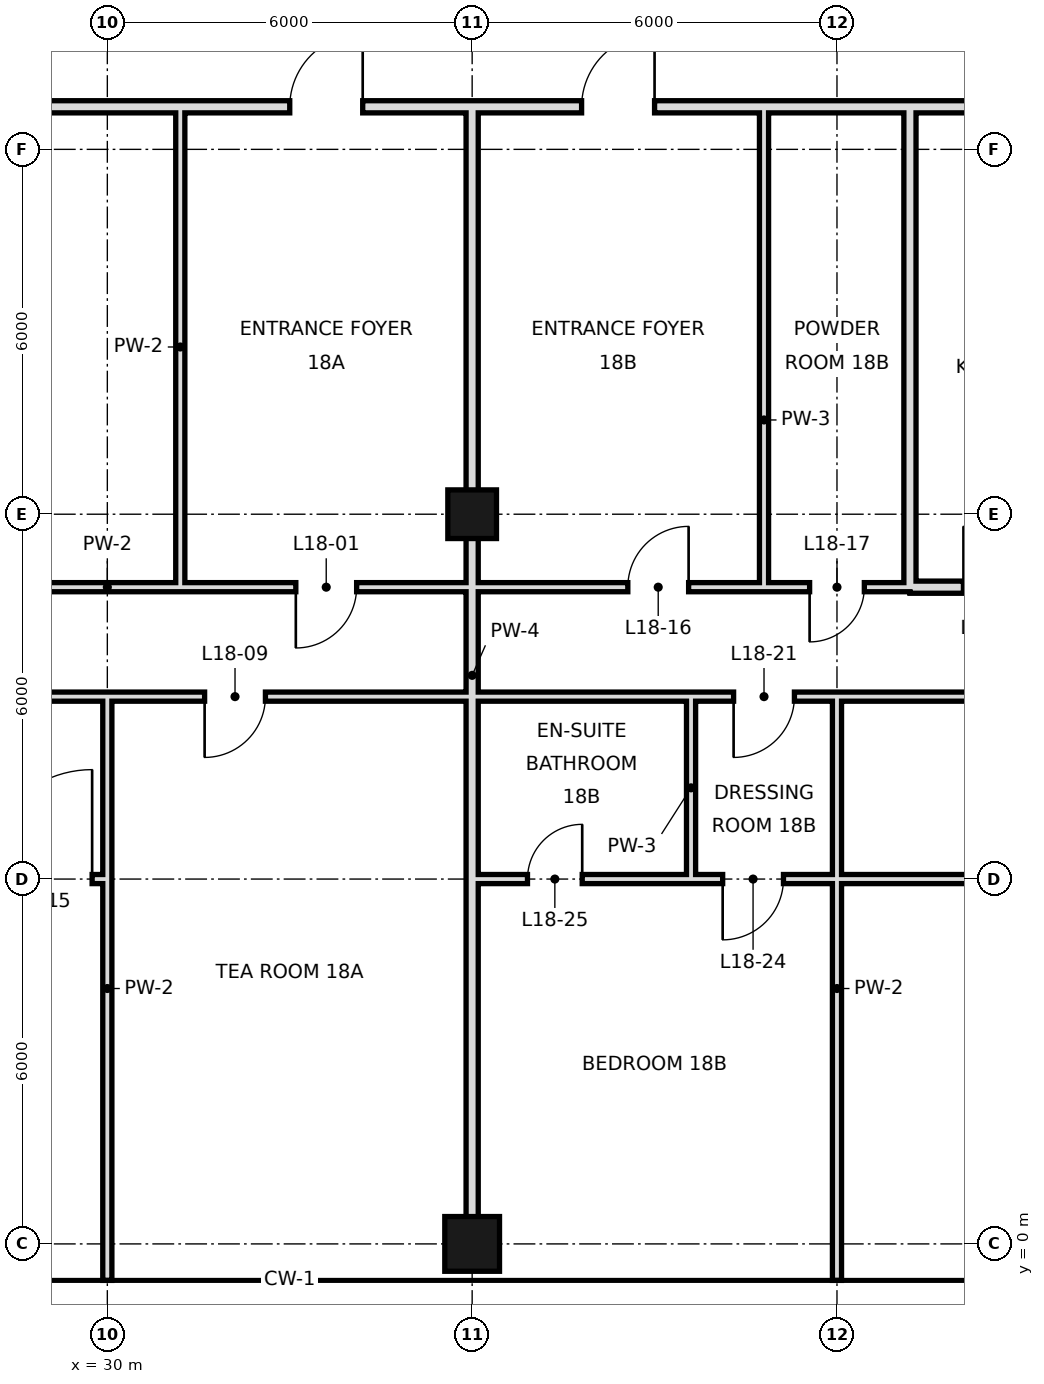
"""IFC4 building model, lengths in metres.
Left out: names, types, materials, properties, quantities, classifications, styles, units other than length and angle.
Written with IfcOpenShell. Run it as: python <this file> out.ifc"""

import sys

from ifc_helpers import new_model, si_unit, direction, frame, frame_2d, origin, origin_2d, place, context, subcontext, project, spatial, rectangle, hollow_rectangle, extrude, element, fill, save


model = new_model("IFC4")
c1 = context("Model", 3, precision=1e-05, world=origin(), true_north=direction((0.0, 1.0)))
c2 = subcontext(c1, "Body", "Model", "MODEL_VIEW")
j1 = project(units=[si_unit("LENGTHUNIT", "METRE"), si_unit("PLANEANGLEUNIT", "RADIAN")], contexts=[c1])
p1 = place(None, origin())
s1 = spatial("IfcSite", under=j1, at=p1, CompositionType="ELEMENT")
p2 = place(p1, origin())
s2 = spatial("IfcBuilding", under=s1, at=p2, CompositionType="ELEMENT")
p3 = place(p2, frame((0.0, 0.0, 85.8)))
s3 = spatial("IfcBuildingStorey", under=s2, at=p3, CompositionType="ELEMENT", Elevation=85.8)
p4 = place(p3, frame((36.0, 0.0, 0.0), z_axis=(0.0, 0.0, 1.0), x_axis=(1.0, 0.0, 0.0)))
e1 = element("IfcColumn", 1, at=p4, inside=s3, PredefinedType="COLUMN", context=c2, shape_type="SweptSolid", body=[
    extrude(hollow_rectangle(XDim=0.9, YDim=0.9, WallThickness=0.045, at=origin_2d()), origin(), (0.0, 0.0, 1.0), 4.4),
])
p5 = place(p3, frame((36.0, 12.0, 0.0), z_axis=(0.0, 0.0, 1.0), x_axis=(1.0, 0.0, 0.0)))
e2 = element("IfcColumn", 2, at=p5, inside=s3, PredefinedType="COLUMN", context=c2, shape_type="SweptSolid", body=[
    extrude(hollow_rectangle(XDim=0.8, YDim=0.8, WallThickness=0.04, at=origin_2d()), origin(), (0.0, 0.0, 1.0), 4.4),
])
p6 = place(p3, frame((30.0, -0.6, 0.0), z_axis=(0.0, 0.0, 1.0), x_axis=(0.0, 1.0, 0.0)))
e3 = element("IfcWall", 3, at=p6, inside=s3, PredefinedType="PARTITIONING", context=c2, shape_type="SweptSolid", body=[
    extrude(rectangle(XDim=9.6, YDim=0.15, at=frame_2d((4.8, 0.0))), origin(), (0.0, 0.0, 1.0), 3.4),
])
p7 = place(p3, frame((31.2, 10.8, 0.0), z_axis=(0.0, 0.0, 1.0), x_axis=(0.0, 1.0, 0.0)))
e4 = element("IfcWall", 4, at=p7, inside=s3, PredefinedType="PARTITIONING", context=c2, shape_type="SweptSolid", body=[
    extrude(rectangle(XDim=7.9, YDim=0.15, at=frame_2d((3.95, 0.0))), origin(), (0.0, 0.0, 1.0), 4.1),
])
p8 = place(p3, frame((36.0, 0.0, 0.0), z_axis=(0.0, 0.0, 1.0), x_axis=(0.0, 1.0, 0.0)))
e5 = element("IfcWall", 5, at=p8, inside=s3, PredefinedType="SOLIDWALL", context=c2, shape_type="SweptSolid", body=[
    extrude(rectangle(XDim=18.7, YDim=0.2, at=frame_2d((9.35, 0.0))), origin(), (0.0, 0.0, 1.0), 3.4),
])
p9 = place(p3, frame((39.6, 6.0, 0.0), z_axis=(0.0, 0.0, 1.0), x_axis=(0.0, 1.0, 0.0)))
e6 = element("IfcWall", 6, at=p9, inside=s3, PredefinedType="PARTITIONING", context=c2, shape_type="SweptSolid", body=[
    extrude(rectangle(XDim=3.0, YDim=0.15, at=frame_2d((1.5, 0.0))), origin(), (0.0, 0.0, 1.0), 4.1),
])
p10 = place(p3, frame((40.8, 10.8, 0.0), z_axis=(0.0, 0.0, 1.0), x_axis=(0.0, 1.0, 0.0)))
e7 = element("IfcWall", 7, at=p10, inside=s3, PredefinedType="PARTITIONING", context=c2, shape_type="SweptSolid", body=[
    extrude(rectangle(XDim=7.9, YDim=0.15, at=frame_2d((3.95, 0.0))), origin(), (0.0, 0.0, 1.0), 4.1),
])
p11 = place(p3, frame((42.0, -0.6, 0.0), z_axis=(0.0, 0.0, 1.0), x_axis=(0.0, 1.0, 0.0)))
e8 = element("IfcWall", 8, at=p11, inside=s3, PredefinedType="PARTITIONING", context=c2, shape_type="SweptSolid", body=[
    extrude(rectangle(XDim=9.6, YDim=0.15, at=frame_2d((4.8, 0.0))), origin(), (0.0, 0.0, 1.0), 3.4),
])
p12 = place(p3, frame((43.2, 10.8, 0.0), z_axis=(0.0, 0.0, 1.0), x_axis=(0.0, 1.0, 0.0)))
e9 = element("IfcWall", 9, at=p12, inside=s3, PredefinedType="SOLIDWALL", context=c2, shape_type="SweptSolid", body=[
    extrude(rectangle(XDim=7.9, YDim=0.2, at=frame_2d((3.95, 0.0))), origin(), (0.0, 0.0, 1.0), 3.4),
])
p13 = place(p3, frame((43.2, 10.8, 0.0), z_axis=(0.0, 0.0, 1.0), x_axis=(1.0, 0.0, 0.0)))
e10 = element("IfcWall", 10, at=p13, inside=s3, PredefinedType="SOLIDWALL", context=c2, shape_type="SweptSolid", body=[
    extrude(rectangle(XDim=3.6, YDim=0.2, at=frame_2d((1.8, 0.0))), origin(), (0.0, 0.0, 1.0), 4.1),
])
p14 = place(p13, frame((0.88, 0.0, 0.0)))
e11 = element("IfcOpeningElement", 11, at=p14, cuts=e10, PredefinedType="OPENING", context=c2, shape_type="SweptSolid", body=[
    extrude(rectangle(XDim=1.0, YDim=2.4, at=frame_2d((0.5, 1.2))), frame((0.0, 0.11, 0.0), z_axis=(0.0, -1.0, 0.0), x_axis=(1.0, 0.0, 0.0)), (0.0, 0.0, 1.0), 0.22),
])
p15 = place(p3, frame((19.2, 10.8, 0.0), z_axis=(0.0, 0.0, 1.0), x_axis=(1.0, 0.0, 0.0)))
e12 = element("IfcWall", 12, at=p15, inside=s3, PredefinedType="PARTITIONING", context=c2, shape_type="SweptSolid", body=[
    extrude(rectangle(XDim=21.6, YDim=0.15, at=frame_2d((10.8, 0.0))), origin(), (0.0, 0.0, 1.0), 4.1),
])
p16 = place(p15, frame((13.9, 0.0, 0.0)))
e13 = element("IfcOpeningElement", 13, at=p16, cuts=e12, PredefinedType="OPENING", context=c2, shape_type="SweptSolid", body=[
    extrude(rectangle(XDim=1.0, YDim=2.4, at=frame_2d((0.5, 1.2))), frame((0.0, 0.085, 0.0), z_axis=(0.0, -1.0, 0.0), x_axis=(1.0, 0.0, 0.0)), (0.0, 0.0, 1.0), 0.17),
])
p17 = place(p15, frame((5.5, 0.0, 0.0)))
e14 = element("IfcOpeningElement", 14, at=p17, cuts=e12, PredefinedType="OPENING", context=c2, shape_type="SweptSolid", body=[
    extrude(rectangle(XDim=1.0, YDim=2.4, at=frame_2d((0.5, 1.2))), frame((0.0, 0.085, 0.0), z_axis=(0.0, -1.0, 0.0), x_axis=(1.0, 0.0, 0.0)), (0.0, 0.0, 1.0), 0.17),
])
p18 = place(p15, frame((19.36, 0.0, 0.0)))
e15 = element("IfcOpeningElement", 15, at=p18, cuts=e12, PredefinedType="OPENING", context=c2, shape_type="SweptSolid", body=[
    extrude(rectangle(XDim=1.0, YDim=2.4, at=frame_2d((0.5, 1.2))), frame((0.0, 0.085, 0.0), z_axis=(0.0, -1.0, 0.0), x_axis=(1.0, 0.0, 0.0)), (0.0, 0.0, 1.0), 0.17),
])
p19 = place(p3, frame((40.8, 10.8, 0.0), z_axis=(0.0, 0.0, 1.0), x_axis=(1.0, 0.0, 0.0)))
e16 = element("IfcWall", 16, at=p19, inside=s3, PredefinedType="PARTITIONING", context=c2, shape_type="SweptSolid", body=[
    extrude(rectangle(XDim=2.4, YDim=0.15, at=frame_2d((1.2, 0.0))), origin(), (0.0, 0.0, 1.0), 4.1),
])
p20 = place(p19, frame((0.75, 0.0, 0.0)))
e17 = element("IfcOpeningElement", 17, at=p20, cuts=e16, PredefinedType="OPENING", context=c2, shape_type="SweptSolid", body=[
    extrude(rectangle(XDim=0.9, YDim=2.4, at=frame_2d((0.45, 1.2))), frame((0.0, 0.085, 0.0), z_axis=(0.0, -1.0, 0.0), x_axis=(1.0, 0.0, 0.0)), (0.0, 0.0, 1.0), 0.17),
])
p21 = place(p3, frame((5.4, 18.7, 0.0), z_axis=(0.0, 0.0, 1.0), x_axis=(1.0, 0.0, 0.0)))
e18 = element("IfcWall", 18, at=p21, inside=s3, PredefinedType="SOLIDWALL", context=c2, shape_type="SweptSolid", body=[
    extrude(rectangle(XDim=37.8, YDim=0.2, at=frame_2d((18.9, 0.0))), origin(), (0.0, 0.0, 1.0), 3.4),
])
p22 = place(p21, frame((27.6, 0.0, 0.0)))
e19 = element("IfcOpeningElement", 19, at=p22, cuts=e18, PredefinedType="OPENING", context=c2, shape_type="SweptSolid", body=[
    extrude(rectangle(XDim=1.2, YDim=2.4, at=frame_2d((0.6, 1.2))), frame((0.0, 0.11, 0.0), z_axis=(0.0, -1.0, 0.0), x_axis=(1.0, 0.0, 0.0)), (0.0, 0.0, 1.0), 0.22),
])
p23 = place(p21, frame((32.4, 0.0, 0.0)))
e20 = element("IfcOpeningElement", 20, at=p23, cuts=e18, PredefinedType="OPENING", context=c2, shape_type="SweptSolid", body=[
    extrude(rectangle(XDim=1.2, YDim=2.4, at=frame_2d((0.6, 1.2))), frame((0.0, 0.11, 0.0), z_axis=(0.0, -1.0, 0.0), x_axis=(1.0, 0.0, 0.0)), (0.0, 0.0, 1.0), 0.22),
])
p24 = place(p3, frame((43.2, 18.7, 0.0), z_axis=(0.0, 0.0, 1.0), x_axis=(1.0, 0.0, 0.0)))
e21 = element("IfcWall", 21, at=p24, inside=s3, PredefinedType="SOLIDWALL", context=c2, shape_type="SweptSolid", body=[
    extrude(rectangle(XDim=1.7, YDim=0.2, at=frame_2d((0.85, 0.0))), origin(), (0.0, 0.0, 1.0), 4.1),
])
p25 = place(p3, frame((18.0, 6.0, 0.0), z_axis=(0.0, 0.0, 1.0), x_axis=(1.0, 0.0, 0.0)))
e22 = element("IfcWall", 22, at=p25, inside=s3, PredefinedType="PARTITIONING", context=c2, shape_type="SweptSolid", body=[
    extrude(rectangle(XDim=12.0, YDim=0.15, at=frame_2d((6.0, 0.0))), origin(), (0.0, 0.0, 1.0), 3.65),
])
p26 = place(p25, frame((9.95, 0.0, 0.0)))
e23 = element("IfcOpeningElement", 23, at=p26, cuts=e22, PredefinedType="OPENING", context=c2, shape_type="SweptSolid", body=[
    extrude(rectangle(XDim=1.8, YDim=2.4, at=frame_2d((0.9, 1.2))), frame((0.0, 0.085, 0.0), z_axis=(0.0, -1.0, 0.0), x_axis=(1.0, 0.0, 0.0)), (0.0, 0.0, 1.0), 0.17),
])
p27 = place(p3, frame((39.6, 6.0, 0.0), z_axis=(0.0, 0.0, 1.0), x_axis=(1.0, 0.0, 0.0)))
e24 = element("IfcWall", 24, at=p27, inside=s3, PredefinedType="PARTITIONING", context=c2, shape_type="SweptSolid", body=[
    extrude(rectangle(XDim=26.4, YDim=0.15, at=frame_2d((13.2, 0.0))), origin(), (0.0, 0.0, 1.0), 3.2),
])
p28 = place(p27, frame((0.52, 0.0, 0.0)))
e25 = element("IfcOpeningElement", 25, at=p28, cuts=e24, PredefinedType="OPENING", context=c2, shape_type="SweptSolid", body=[
    extrude(rectangle(XDim=1.0, YDim=2.4, at=frame_2d((0.5, 1.2))), frame((0.0, 0.085, 0.0), z_axis=(0.0, -1.0, 0.0), x_axis=(1.0, 0.0, 0.0)), (0.0, 0.0, 1.0), 0.17),
])
p29 = place(p27, frame((10.0, 0.0, 0.0)))
e26 = element("IfcOpeningElement", 26, at=p29, cuts=e24, PredefinedType="OPENING", context=c2, shape_type="SweptSolid", body=[
    extrude(rectangle(XDim=1.0, YDim=2.4, at=frame_2d((0.5, 1.2))), frame((0.0, 0.085, 0.0), z_axis=(0.0, -1.0, 0.0), x_axis=(1.0, 0.0, 0.0)), (0.0, 0.0, 1.0), 0.17),
])
p30 = place(p27, frame((14.65, 0.0, 0.0)))
e27 = element("IfcOpeningElement", 27, at=p30, cuts=e24, PredefinedType="OPENING", context=c2, shape_type="SweptSolid", body=[
    extrude(rectangle(XDim=1.8, YDim=2.4, at=frame_2d((0.9, 1.2))), frame((0.0, 0.085, 0.0), z_axis=(0.0, -1.0, 0.0), x_axis=(1.0, 0.0, 0.0)), (0.0, 0.0, 1.0), 0.17),
])
p31 = place(p3, frame((36.0, 6.0, 0.0), z_axis=(0.0, 0.0, 1.0), x_axis=(1.0, 0.0, 0.0)))
e28 = element("IfcWall", 28, at=p31, inside=s3, PredefinedType="PARTITIONING", context=c2, shape_type="SweptSolid", body=[
    extrude(rectangle(XDim=3.6, YDim=0.15, at=frame_2d((1.8, 0.0))), origin(), (0.0, 0.0, 1.0), 3.65),
])
p32 = place(p31, frame((0.91, 0.0, 0.0)))
e29 = element("IfcOpeningElement", 29, at=p32, cuts=e28, PredefinedType="OPENING", context=c2, shape_type="SweptSolid", body=[
    extrude(rectangle(XDim=0.9, YDim=2.4, at=frame_2d((0.45, 1.2))), frame((0.0, 0.085, 0.0), z_axis=(0.0, -1.0, 0.0), x_axis=(1.0, 0.0, 0.0)), (0.0, 0.0, 1.0), 0.17),
])
p33 = place(p3, frame((18.0, 9.0, 0.0), z_axis=(0.0, 0.0, 1.0), x_axis=(1.0, 0.0, 0.0)))
e30 = element("IfcWall", 30, at=p33, inside=s3, PredefinedType="PARTITIONING", context=c2, shape_type="SweptSolid", body=[
    extrude(rectangle(XDim=18.0, YDim=0.15, at=frame_2d((9.0, 0.0))), origin(), (0.0, 0.0, 1.0), 4.1),
])
p34 = place(p33, frame((3.16, 0.0, 0.0)))
e31 = element("IfcOpeningElement", 31, at=p34, cuts=e30, PredefinedType="OPENING", context=c2, shape_type="SweptSolid", body=[
    extrude(rectangle(XDim=1.8, YDim=2.4, at=frame_2d((0.9, 1.2))), frame((0.0, 0.085, 0.0), z_axis=(0.0, -1.0, 0.0), x_axis=(1.0, 0.0, 0.0)), (0.0, 0.0, 1.0), 0.17),
])
p35 = place(p33, frame((13.6, 0.0, 0.0)))
e32 = element("IfcOpeningElement", 32, at=p35, cuts=e30, PredefinedType="OPENING", context=c2, shape_type="SweptSolid", body=[
    extrude(rectangle(XDim=1.0, YDim=2.4, at=frame_2d((0.5, 1.2))), frame((0.0, 0.085, 0.0), z_axis=(0.0, -1.0, 0.0), x_axis=(1.0, 0.0, 0.0)), (0.0, 0.0, 1.0), 0.17),
])
p36 = place(p3, frame((39.6, 9.0, 0.0), z_axis=(0.0, 0.0, 1.0), x_axis=(1.0, 0.0, 0.0)))
e33 = element("IfcWall", 33, at=p36, inside=s3, PredefinedType="PARTITIONING", context=c2, shape_type="SweptSolid", body=[
    extrude(rectangle(XDim=27.0, YDim=0.15, at=frame_2d((13.5, 0.0))), origin(), (0.0, 0.0, 1.0), 4.1),
])
p37 = place(p36, frame((0.7, 0.0, 0.0)))
e34 = element("IfcOpeningElement", 34, at=p37, cuts=e33, PredefinedType="OPENING", context=c2, shape_type="SweptSolid", body=[
    extrude(rectangle(XDim=1.0, YDim=2.4, at=frame_2d((0.5, 1.2))), frame((0.0, 0.085, 0.0), z_axis=(0.0, -1.0, 0.0), x_axis=(1.0, 0.0, 0.0)), (0.0, 0.0, 1.0), 0.17),
])
p38 = place(p36, frame((7.9, 0.0, 0.0)))
e35 = element("IfcOpeningElement", 35, at=p38, cuts=e33, PredefinedType="OPENING", context=c2, shape_type="SweptSolid", body=[
    extrude(rectangle(XDim=1.0, YDim=2.4, at=frame_2d((0.5, 1.2))), frame((0.0, 0.085, 0.0), z_axis=(0.0, -1.0, 0.0), x_axis=(1.0, 0.0, 0.0)), (0.0, 0.0, 1.0), 0.17),
])
p39 = place(p36, frame((14.65, 0.0, 0.0)))
e36 = element("IfcOpeningElement", 36, at=p39, cuts=e33, PredefinedType="OPENING", context=c2, shape_type="SweptSolid", body=[
    extrude(rectangle(XDim=1.8, YDim=2.4, at=frame_2d((0.9, 1.2))), frame((0.0, 0.085, 0.0), z_axis=(0.0, -1.0, 0.0), x_axis=(1.0, 0.0, 0.0)), (0.0, 0.0, 1.0), 0.17),
])
p40 = place(p3, frame((36.0, 9.0, 0.0), z_axis=(0.0, 0.0, 1.0), x_axis=(1.0, 0.0, 0.0)))
e37 = element("IfcWall", 37, at=p40, inside=s3, PredefinedType="PARTITIONING", context=c2, shape_type="SweptSolid", body=[
    extrude(rectangle(XDim=3.6, YDim=0.15, at=frame_2d((1.8, 0.0))), origin(), (0.0, 0.0, 1.0), 4.1),
])
p41 = place(p16, frame((1.0, 0.0, 0.0), z_axis=(0.0, 0.0, 1.0), x_axis=(-1.0, 0.0, 0.0)))
e38 = element("IfcDoor", 38, at=p41, inside=s3, OperationType="SINGLE_SWING_RIGHT", PredefinedType="DOOR", context=c2, shape_type="SweptSolid", body=[
    extrude(rectangle(XDim=1.0, YDim=2.4, at=frame_2d((0.5, 1.2))), frame((0.0, 0.025, 0.0), z_axis=(0.0, -1.0, 0.0), x_axis=(1.0, 0.0, 0.0)), (0.0, 0.0, 1.0), 0.05),
])
fill(e13, e38)
p42 = place(p35, frame((1.0, 0.0, 0.0), z_axis=(0.0, 0.0, 1.0), x_axis=(-1.0, 0.0, 0.0)))
e39 = element("IfcDoor", 39, at=p42, inside=s3, OperationType="SINGLE_SWING_RIGHT", PredefinedType="DOOR", context=c2, shape_type="SweptSolid", body=[
    extrude(rectangle(XDim=1.0, YDim=2.4, at=frame_2d((0.5, 1.2))), frame((0.0, 0.025, 0.0), z_axis=(0.0, -1.0, 0.0), x_axis=(1.0, 0.0, 0.0)), (0.0, 0.0, 1.0), 0.05),
])
fill(e32, e39)
p43 = place(p26, frame((1.8, 0.0, 0.0), z_axis=(0.0, 0.0, 1.0), x_axis=(-1.0, 0.0, 0.0)))
e40 = element("IfcDoor", 40, at=p43, inside=s3, OperationType="SINGLE_SWING_LEFT", PredefinedType="DOOR", context=c2, shape_type="SweptSolid", body=[
    extrude(rectangle(XDim=1.8, YDim=2.4, at=frame_2d((0.9, 1.2))), frame((0.0, 0.025, 0.0), z_axis=(0.0, -1.0, 0.0), x_axis=(1.0, 0.0, 0.0)), (0.0, 0.0, 1.0), 0.05),
])
fill(e23, e40)
p44 = place(p18, frame((1.0, 0.0, 0.0), z_axis=(0.0, 0.0, 1.0), x_axis=(-1.0, 0.0, 0.0)))
e41 = element("IfcDoor", 41, at=p44, inside=s3, OperationType="SINGLE_SWING_LEFT", PredefinedType="DOOR", context=c2, shape_type="SweptSolid", body=[
    extrude(rectangle(XDim=1.0, YDim=2.4, at=frame_2d((0.5, 1.2))), frame((0.0, 0.025, 0.0), z_axis=(0.0, -1.0, 0.0), x_axis=(1.0, 0.0, 0.0)), (0.0, 0.0, 1.0), 0.05),
])
fill(e15, e41)
p45 = place(p20, frame((0.9, 0.0, 0.0), z_axis=(0.0, 0.0, 1.0), x_axis=(-1.0, 0.0, 0.0)))
e42 = element("IfcDoor", 42, at=p45, inside=s3, OperationType="SINGLE_SWING_RIGHT", PredefinedType="DOOR", context=c2, shape_type="SweptSolid", body=[
    extrude(rectangle(XDim=0.9, YDim=2.4, at=frame_2d((0.45, 1.2))), frame((0.0, 0.025, 0.0), z_axis=(0.0, -1.0, 0.0), x_axis=(1.0, 0.0, 0.0)), (0.0, 0.0, 1.0), 0.05),
])
fill(e17, e42)
p46 = place(p14, origin())
e43 = element("IfcDoor", 43, at=p46, inside=s3, OperationType="SINGLE_SWING_LEFT", PredefinedType="DOOR", context=c2, shape_type="SweptSolid", body=[
    extrude(rectangle(XDim=1.0, YDim=2.4, at=frame_2d((0.5, 1.2))), frame((0.0, 0.025, 0.0), z_axis=(0.0, -1.0, 0.0), x_axis=(1.0, 0.0, 0.0)), (0.0, 0.0, 1.0), 0.05),
])
fill(e11, e43)
p47 = place(p37, frame((1.0, 0.0, 0.0), z_axis=(0.0, 0.0, 1.0), x_axis=(-1.0, 0.0, 0.0)))
e44 = element("IfcDoor", 44, at=p47, inside=s3, OperationType="SINGLE_SWING_RIGHT", PredefinedType="DOOR", context=c2, shape_type="SweptSolid", body=[
    extrude(rectangle(XDim=1.0, YDim=2.4, at=frame_2d((0.5, 1.2))), frame((0.0, 0.025, 0.0), z_axis=(0.0, -1.0, 0.0), x_axis=(1.0, 0.0, 0.0)), (0.0, 0.0, 1.0), 0.05),
])
fill(e34, e44)
p48 = place(p28, frame((1.0, 0.0, 0.0), z_axis=(0.0, 0.0, 1.0), x_axis=(-1.0, 0.0, 0.0)))
e45 = element("IfcDoor", 45, at=p48, inside=s3, OperationType="SINGLE_SWING_RIGHT", PredefinedType="DOOR", context=c2, shape_type="SweptSolid", body=[
    extrude(rectangle(XDim=1.0, YDim=2.4, at=frame_2d((0.5, 1.2))), frame((0.0, 0.025, 0.0), z_axis=(0.0, -1.0, 0.0), x_axis=(1.0, 0.0, 0.0)), (0.0, 0.0, 1.0), 0.05),
])
fill(e25, e45)
p49 = place(p32, frame((0.9, 0.0, 0.0), z_axis=(0.0, 0.0, 1.0), x_axis=(-1.0, 0.0, 0.0)))
e46 = element("IfcDoor", 46, at=p49, inside=s3, OperationType="SINGLE_SWING_LEFT", PredefinedType="DOOR", context=c2, shape_type="SweptSolid", body=[
    extrude(rectangle(XDim=0.9, YDim=2.4, at=frame_2d((0.45, 1.2))), frame((0.0, 0.025, 0.0), z_axis=(0.0, -1.0, 0.0), x_axis=(1.0, 0.0, 0.0)), (0.0, 0.0, 1.0), 0.05),
])
fill(e29, e46)
p50 = place(p22, frame((1.2, 0.0, 0.0), z_axis=(0.0, 0.0, 1.0), x_axis=(-1.0, 0.0, 0.0)))
e47 = element("IfcDoor", 47, at=p50, inside=s3, OperationType="SINGLE_SWING_LEFT", PredefinedType="DOOR", context=c2, shape_type="SweptSolid", body=[
    extrude(rectangle(XDim=1.2, YDim=2.4, at=frame_2d((0.6, 1.2))), frame((0.0, 0.025, 0.0), z_axis=(0.0, -1.0, 0.0), x_axis=(1.0, 0.0, 0.0)), (0.0, 0.0, 1.0), 0.05),
])
fill(e19, e47)
p51 = place(p23, frame((1.2, 0.0, 0.0), z_axis=(0.0, 0.0, 1.0), x_axis=(-1.0, 0.0, 0.0)))
e48 = element("IfcDoor", 48, at=p51, inside=s3, OperationType="SINGLE_SWING_LEFT", PredefinedType="DOOR", context=c2, shape_type="SweptSolid", body=[
    extrude(rectangle(XDim=1.2, YDim=2.4, at=frame_2d((0.6, 1.2))), frame((0.0, 0.025, 0.0), z_axis=(0.0, -1.0, 0.0), x_axis=(1.0, 0.0, 0.0)), (0.0, 0.0, 1.0), 0.05),
])
fill(e20, e48)
save(model, sys.argv[1])
